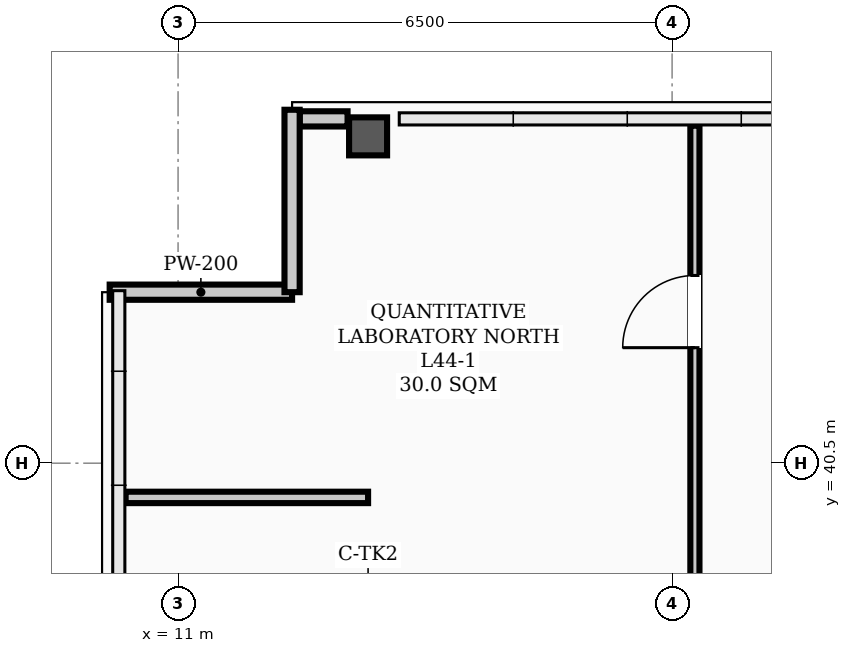
"""IFC4 building model, lengths in metres.
Left out: names, types, materials, properties, quantities, classifications, styles, units other than length and angle.
Written with IfcOpenShell. Run it as: python <this file> out.ifc"""

import sys

from ifc_helpers import new_model, si_unit, direction, frame, frame_2d, origin, origin_2d, place, context, subcontext, project, spatial, rectangle, hollow_rectangle, extrude, element, fill, save


model = new_model("IFC4")
c1 = context("Model", 3, precision=1e-05, world=origin(), true_north=direction((0.0, 1.0)))
c2 = subcontext(c1, "Body", "Model", "MODEL_VIEW")
j1 = project(units=[si_unit("LENGTHUNIT", "METRE"), si_unit("PLANEANGLEUNIT", "RADIAN")], contexts=[c1])
p1 = place(None, origin())
s1 = spatial("IfcSite", under=j1, at=p1, CompositionType="ELEMENT")
p2 = place(p1, origin())
s2 = spatial("IfcBuilding", under=s1, at=p2, CompositionType="ELEMENT")
p3 = place(p2, frame((0.0, 0.0, 177.3)))
s3 = spatial("IfcBuildingStorey", under=s2, at=p3, CompositionType="ELEMENT", Elevation=177.3)
p4 = place(p3, frame((13.5, 44.8, 0.0), z_axis=(0.0, 0.0, 1.0), x_axis=(1.0, 0.0, 0.0)))
e1 = element("IfcColumn", 1, at=p4, inside=s3, PredefinedType="COLUMN", context=c2, shape_type="SweptSolid", body=[
    extrude(hollow_rectangle(XDim=0.5, YDim=0.5, WallThickness=0.024, InnerFilletRadius=0.012, OuterFilletRadius=0.036, at=origin_2d()), origin(), (0.0, 0.0, 1.0), 3.9),
])
p5 = place(p3, frame((12.6, 45.03, 0.0), z_axis=(0.0, 0.0, 1.0), x_axis=(1.0, 0.0, 0.0)))
e2 = element("IfcWall", 2, at=p5, inside=s3, PredefinedType="PARAPET", context=c2, shape_type="SweptSolid", body=[
    extrude(rectangle(XDim=0.63, YDim=0.2, at=frame_2d((0.315, 0.0))), origin(), (0.0, 0.0, 1.0), 1.2),
])
for number, where, z_axis, x_axis in (
    (3, (10.1, 42.75, 0.0), (0.0, 0.0, 1.0), (1.0, 0.0, 0.0)),
    (4, (12.5, 42.75, 0.0), (0.0, 0.0, 1.0), (0.0, 1.0, 0.0)),
):
    element("IfcWall", number, at=place(p3, frame(where, z_axis=z_axis, x_axis=x_axis)), inside=s3, PredefinedType="PARAPET", context=c2, shape_type="SweptSolid", body=[
        extrude(rectangle(XDim=2.4, YDim=0.2, at=frame_2d((1.2, 0.0))), origin(), (0.0, 0.0, 1.0), 1.2),
    ])
p6 = place(p3, frame((10.31, 40.05, 0.0), z_axis=(0.0, 0.0, 1.0), x_axis=(1.0, 0.0, 0.0)))
e5 = element("IfcWall", 5, at=p6, inside=s3, PredefinedType="PARTITIONING", context=c2, shape_type="SweptSolid", body=[
    extrude(rectangle(XDim=3.19, YDim=0.15, at=frame_2d((1.595, 0.0))), origin(), (0.0, 0.0, 1.0), 3.2),
])
p7 = place(p3, frame((17.8, 38.585, 0.0), z_axis=(0.0, 0.0, 1.0), x_axis=(0.0, 1.0, 0.0)))
e6 = element("IfcWall", 6, at=p7, inside=s3, PredefinedType="PARTITIONING", context=c2, shape_type="SweptSolid", body=[
    extrude(rectangle(XDim=6.355, YDim=0.12, at=frame_2d((3.177, 0.0))), origin(), (0.0, 0.0, 1.0), 3.212),
])
p8 = place(p7, frame((3.435, 0.0, 0.0)))
e7 = element("IfcOpeningElement", 7, at=p8, cuts=e6, PredefinedType="OPENING", context=c2, shape_type="SweptSolid", body=[
    extrude(rectangle(XDim=0.95, YDim=2.08, at=frame_2d((0.475, 1.04))), frame((0.0, 0.07, 0.0), z_axis=(0.0, -1.0, 0.0), x_axis=(1.0, 0.0, 0.0)), (0.0, 0.0, 1.0), 0.14),
])
p9 = place(p8, origin())
e8 = element("IfcDoor", 8, at=p9, inside=s3, OperationType="SINGLE_SWING_LEFT", PredefinedType="DOOR", context=c2, shape_type="SweptSolid", body=[
    extrude(rectangle(XDim=0.95, YDim=2.08, at=frame_2d((0.475, 1.04))), frame((0.0, 0.025, 0.0), z_axis=(0.0, -1.0, 0.0), x_axis=(1.0, 0.0, 0.0)), (0.0, 0.0, 1.0), 0.05),
])
fill(e7, e8)
save(model, sys.argv[1])
